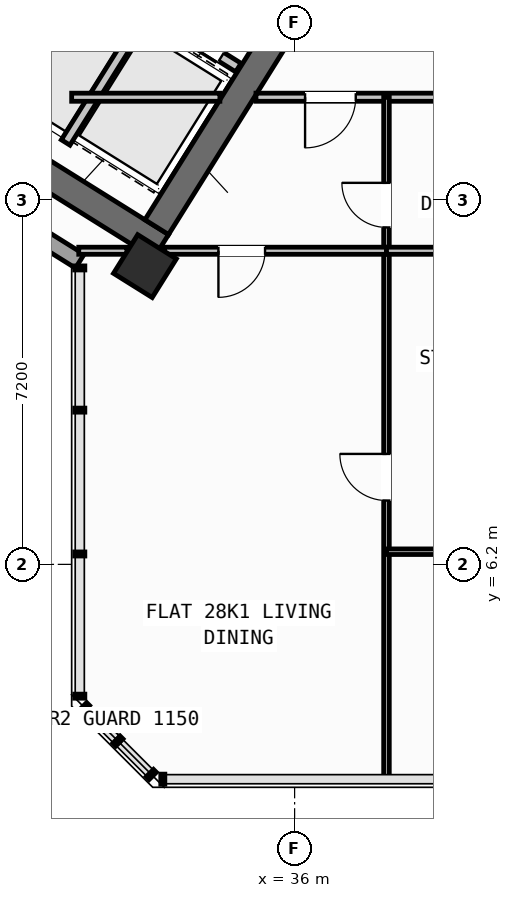
"""IFC4 building model, lengths in metres.
Left out: names, types, materials, properties, quantities, classifications, styles, units other than length and angle.
Written with IfcOpenShell. Run it as: python <this file> out.ifc"""

import sys

from ifc_helpers import new_model, si_unit, direction, frame, frame_2d, origin, origin_2d, place, context, subcontext, project, spatial, rectangle, hollow_rectangle, extrude, source, transform, mapped, element, fill, save


model = new_model("IFC4")
c1 = context("Model", 3, precision=1e-05, world=origin(), true_north=direction((0.0, 1.0)))
c2 = subcontext(c1, "Body", "Model", "MODEL_VIEW")
j1 = project(units=[si_unit("LENGTHUNIT", "METRE"), si_unit("PLANEANGLEUNIT", "RADIAN")], contexts=[c1])
p1 = place(None, origin())
s1 = spatial("IfcSite", under=j1, at=p1, CompositionType="ELEMENT")
p2 = place(p1, origin())
s2 = spatial("IfcBuilding", under=s1, at=p2, CompositionType="ELEMENT")
p3 = place(p2, frame((0.0, 0.0, 112.5)))
s3 = spatial("IfcBuildingStorey", under=s2, at=p3, CompositionType="ELEMENT", Elevation=112.5)
p4 = place(p3, frame((33.366, 12.477, 0.0), z_axis=(0.0, 0.0, 1.0), x_axis=(-0.848047359947, 0.529920442413, 0.0)))
e1 = element("IfcWall", 1, at=p4, inside=s3, PredefinedType="SHEAR", context=c2, shape_type="SweptSolid", body=[
    extrude(rectangle(XDim=13.14, YDim=0.55, at=frame_2d((6.57, 0.0))), origin(), (0.0, 0.0, 1.0), 3.35),
])
p5 = place(p3, frame((36.683, 18.304, 0.0), z_axis=(0.0, 0.0, 1.0), x_axis=(-0.529896466841, -0.848062341122, 0.0)))
e2 = element("IfcWall", 2, at=p5, inside=s3, PredefinedType="SHEAR", context=c2, shape_type="SweptSolid", body=[
    extrude(rectangle(XDim=6.425, YDim=0.55, at=frame_2d((3.212, 0.0))), origin(), (0.0, 0.0, 1.0), 3.35),
])
m1 = source(origin(), c2, "Body", "SweptSolid", [
    extrude(hollow_rectangle(XDim=0.9, YDim=0.9, WallThickness=0.036, at=origin_2d()), origin(), (0.0, 0.0, 1.0), 3.6),
])
p6 = place(p3, frame((33.046, 12.087, 0.0), z_axis=(0.0, 0.0, 1.0), x_axis=(-0.848048096156, 0.529919264233, 0.0)))
e3 = element("IfcColumn", 3, at=p6, inside=s3, PredefinedType="COLUMN", context=c2, shape_type="MappedRepresentation", body=[
    mapped(m1, transform((0.0, 0.0, 0.0), scale=1.0)),
])
p7 = place(p3, frame((31.76, 12.183, 0.0), z_axis=(0.0, 0.0, 1.0), x_axis=(-0.848047074256, 0.529920899612, 0.0)))
e4 = element("IfcWall", 4, at=p7, inside=s3, PredefinedType="STANDARD", context=c2, shape_type="SweptSolid", body=[
    extrude(rectangle(XDim=30.652, YDim=0.32, at=frame_2d((15.326, 0.0))), origin(), (0.0, 0.0, 1.0), 3.35),
])
p8 = place(p7, frame((15.153, 0.0, 0.0)))
e5 = element("IfcOpeningElement", 5, at=p8, cuts=e4, PredefinedType="OPENING", context=c2, shape_type="SweptSolid", body=[
    extrude(rectangle(XDim=1.2, YDim=2.15, at=frame_2d((0.6, 1.075))), frame((0.0, 0.17, 0.0), z_axis=(0.0, -1.0, 0.0), x_axis=(1.0, 0.0, 0.0)), (0.0, 0.0, 1.0), 0.34),
])
p9 = place(p7, frame((2.002, 0.0, 0.8)))
e6 = element("IfcOpeningElement", 6, at=p9, cuts=e4, PredefinedType="OPENING", context=c2, shape_type="SweptSolid", body=[
    extrude(rectangle(XDim=2.1, YDim=1.55, at=frame_2d((1.05, 0.775))), frame((0.0, 0.17, 0.0), z_axis=(0.0, -1.0, 0.0), x_axis=(1.0, 0.0, 0.0)), (0.0, 0.0, 1.0), 0.34),
])
p10 = place(p7, frame((7.206, 0.0, 0.8)))
e7 = element("IfcOpeningElement", 7, at=p10, cuts=e4, PredefinedType="OPENING", context=c2, shape_type="SweptSolid", body=[
    extrude(rectangle(XDim=2.1, YDim=1.55, at=frame_2d((1.05, 0.775))), frame((0.0, 0.17, 0.0), z_axis=(0.0, -1.0, 0.0), x_axis=(1.0, 0.0, 0.0)), (0.0, 0.0, 1.0), 0.34),
])
p11 = place(p7, frame((12.648, 0.0, 1.0)))
e8 = element("IfcOpeningElement", 8, at=p11, cuts=e4, PredefinedType="OPENING", context=c2, shape_type="SweptSolid", body=[
    extrude(rectangle(XDim=0.9, YDim=1.25, at=frame_2d((0.45, 0.625))), frame((0.0, 0.17, 0.0), z_axis=(0.0, -1.0, 0.0), x_axis=(1.0, 0.0, 0.0)), (0.0, 0.0, 1.0), 0.34),
])
p12 = place(p7, frame((19.59, 0.0, 0.95)))
e9 = element("IfcOpeningElement", 9, at=p12, cuts=e4, PredefinedType="OPENING", context=c2, shape_type="SweptSolid", body=[
    extrude(rectangle(XDim=1.2, YDim=1.4, at=frame_2d((0.6, 0.7))), frame((0.0, 0.17, 0.0), z_axis=(0.0, -1.0, 0.0), x_axis=(1.0, 0.0, 0.0)), (0.0, 0.0, 1.0), 0.34),
])
p13 = place(p7, frame((25.966, 0.0, 1.0)))
e10 = element("IfcOpeningElement", 10, at=p13, cuts=e4, PredefinedType="OPENING", context=c2, shape_type="SweptSolid", body=[
    extrude(rectangle(XDim=0.9, YDim=1.25, at=frame_2d((0.45, 0.625))), frame((0.0, 0.17, 0.0), z_axis=(0.0, -1.0, 0.0), x_axis=(1.0, 0.0, 0.0)), (0.0, 0.0, 1.0), 0.34),
])
p14 = place(p7, frame((28.871, 0.0, 1.0)))
e11 = element("IfcOpeningElement", 11, at=p14, cuts=e4, PredefinedType="OPENING", context=c2, shape_type="SweptSolid", body=[
    extrude(rectangle(XDim=0.9, YDim=1.25, at=frame_2d((0.45, 0.625))), frame((0.0, 0.17, 0.0), z_axis=(0.0, -1.0, 0.0), x_axis=(1.0, 0.0, 0.0)), (0.0, 0.0, 1.0), 0.34),
])
p15 = place(p3, frame((31.288, 18.256, 0.0), z_axis=(0.0, 0.0, 1.0), x_axis=(-0.529943379326, -0.848033026897, 0.0)))
e12 = element("IfcWall", 12, at=p15, inside=s3, PredefinedType="SHEAR", context=c2, shape_type="SweptSolid", body=[
    extrude(rectangle(XDim=3.16, YDim=0.26, at=frame_2d((1.58, 0.0))), origin(), (0.0, 0.0, 1.0), 3.35),
])
p16 = place(p3, frame((34.891, 16.005, 0.0), z_axis=(0.0, 0.0, 1.0), x_axis=(-0.848062873452, 0.529895614884, 0.0)))
e13 = element("IfcWall", 13, at=p16, inside=s3, PredefinedType="STANDARD", context=c2, shape_type="SweptSolid", body=[
    extrude(rectangle(XDim=4.248, YDim=0.2, at=frame_2d((2.124, 0.0))), origin(), (0.0, 0.0, 1.0), 3.34),
])
p17 = place(p16, frame((0.398, 0.0, 0.0)))
e14 = element("IfcOpeningElement", 14, at=p17, cuts=e13, PredefinedType="OPENING", context=c2, shape_type="SweptSolid", body=[
    extrude(rectangle(XDim=1.3, YDim=2.2, at=frame_2d((0.65, 1.1))), frame((0.0, 0.11, 0.0), z_axis=(0.0, -1.0, 0.0), x_axis=(1.0, 0.0, 0.0)), (0.0, 0.0, 1.0), 0.22),
])
p18 = place(p16, frame((2.473, 0.0, 0.0)))
e15 = element("IfcOpeningElement", 15, at=p18, cuts=e13, PredefinedType="OPENING", context=c2, shape_type="SweptSolid", body=[
    extrude(rectangle(XDim=1.45, YDim=2.25, at=frame_2d((0.725, 1.125))), frame((0.0, 0.11, 0.0), z_axis=(0.0, -1.0, 0.0), x_axis=(1.0, 0.0, 0.0)), (0.0, 0.0, 1.0), 0.22),
])
p19 = place(p3, frame((33.029, 17.003, 0.0), z_axis=(0.0, 0.0, 1.0), x_axis=(-0.529916267533, -0.848049968695, 0.0)))
e16 = element("IfcWall", 16, at=p19, inside=s3, PredefinedType="STANDARD", context=c2, shape_type="SweptSolid", body=[
    extrude(rectangle(XDim=2.92, YDim=0.2, at=frame_2d((1.46, 0.0))), origin(), (0.0, 0.0, 1.0), 3.34),
])
p20 = place(p3, frame((31.6, 15.42, 0.0), z_axis=(0.0, 0.0, 1.0), x_axis=(1.0, 0.0, 0.0)))
e17 = element("IfcWall", 17, at=p20, inside=s3, PredefinedType="PARTITIONING", context=c2, shape_type="SweptSolid", body=[
    extrude(rectangle(XDim=2.925, YDim=0.16, at=frame_2d((1.462, 0.0))), origin(), (0.0, 0.0, 1.0), 3.34),
])
p21 = place(p3, frame((35.237, 15.42, 0.0), z_axis=(0.0, 0.0, 1.0), x_axis=(1.0, 0.0, 0.0)))
e18 = element("IfcWall", 18, at=p21, inside=s3, PredefinedType="PARTITIONING", context=c2, shape_type="SweptSolid", body=[
    extrude(rectangle(XDim=15.432, YDim=0.16, at=frame_2d((7.716, 0.0))), origin(), (0.0, 0.0, 1.0), 3.34),
])
p22 = place(p21, frame((0.969, 0.0, 0.0)))
e19 = element("IfcOpeningElement", 19, at=p22, cuts=e18, PredefinedType="OPENING", context=c2, shape_type="SweptSolid", body=[
    extrude(rectangle(XDim=1.0, YDim=2.1, at=frame_2d((0.5, 1.05))), frame((0.0, 0.09, 0.0), z_axis=(0.0, -1.0, 0.0), x_axis=(1.0, 0.0, 0.0)), (0.0, 0.0, 1.0), 0.18),
])
p23 = place(p21, frame((8.799, 0.0, 0.0)))
e20 = element("IfcOpeningElement", 20, at=p23, cuts=e18, PredefinedType="OPENING", context=c2, shape_type="SweptSolid", body=[
    extrude(rectangle(XDim=1.0, YDim=2.1, at=frame_2d((0.5, 1.05))), frame((0.0, 0.09, 0.0), z_axis=(0.0, -1.0, 0.0), x_axis=(1.0, 0.0, 0.0)), (0.0, 0.0, 1.0), 0.18),
])
p24 = place(p3, frame((37.813, 1.96, 0.0), z_axis=(0.0, 0.0, 1.0), x_axis=(0.0, 1.0, 0.0)))
e21 = element("IfcWall", 21, at=p24, inside=s3, PredefinedType="PARTITIONING", context=c2, shape_type="SweptSolid", body=[
    extrude(rectangle(XDim=13.46, YDim=0.11, at=frame_2d((6.73, 0.0))), origin(), (0.0, 0.0, 1.0), 3.34),
])
p25 = place(p24, frame((5.5, 0.0, 0.0)))
e22 = element("IfcOpeningElement", 22, at=p25, cuts=e21, PredefinedType="OPENING", context=c2, shape_type="SweptSolid", body=[
    extrude(rectangle(XDim=0.92, YDim=2.08, at=frame_2d((0.46, 1.04))), frame((0.0, 0.065, 0.0), z_axis=(0.0, -1.0, 0.0), x_axis=(1.0, 0.0, 0.0)), (0.0, 0.0, 1.0), 0.13),
])
p26 = place(p24, frame((10.89, 0.0, 0.0)))
e23 = element("IfcOpeningElement", 23, at=p26, cuts=e21, PredefinedType="OPENING", context=c2, shape_type="SweptSolid", body=[
    extrude(rectangle(XDim=0.88, YDim=2.08, at=frame_2d((0.44, 1.04))), frame((0.0, 0.065, 0.0), z_axis=(0.0, -1.0, 0.0), x_axis=(1.0, 0.0, 0.0)), (0.0, 0.0, 1.0), 0.13),
])
p27 = place(p3, frame((31.74, 12.39, 0.0), z_axis=(0.0, 0.0, 1.0), x_axis=(1.0, 0.0, 0.0)))
e24 = element("IfcWall", 24, at=p27, inside=s3, PredefinedType="PLUMBINGWALL", context=c2, shape_type="SweptSolid", body=[
    extrude(rectangle(XDim=0.951, YDim=0.14, at=frame_2d((0.475, 0.0))), origin(), (0.0, 0.0, 1.0), 3.34),
])
p28 = place(p3, frame((33.433, 12.39, 0.0), z_axis=(0.0, 0.0, 1.0), x_axis=(1.0, 0.0, 0.0)))
e25 = element("IfcWall", 25, at=p28, inside=s3, PredefinedType="PLUMBINGWALL", context=c2, shape_type="SweptSolid", body=[
    extrude(rectangle(XDim=4.38, YDim=0.14, at=frame_2d((2.19, 0.0))), origin(), (0.0, 0.0, 1.0), 2.525),
])
p29 = place(p28, frame((1.064, 0.0, 0.0)))
e26 = element("IfcOpeningElement", 26, at=p29, cuts=e25, PredefinedType="OPENING", context=c2, shape_type="SweptSolid", body=[
    extrude(rectangle(XDim=0.92, YDim=2.08, at=frame_2d((0.46, 1.04))), frame((0.0, 0.08, 0.0), z_axis=(0.0, -1.0, 0.0), x_axis=(1.0, 0.0, 0.0)), (0.0, 0.0, 1.0), 0.16),
])
p30 = place(p3, frame((37.813, 12.39, 0.0), z_axis=(0.0, 0.0, 1.0), x_axis=(1.0, 0.0, 0.0)))
e27 = element("IfcWall", 27, at=p30, inside=s3, PredefinedType="PLUMBINGWALL", context=c2, shape_type="SweptSolid", body=[
    extrude(rectangle(XDim=4.137, YDim=0.14, at=frame_2d((2.068, 0.0))), origin(), (0.0, 0.0, 1.0), 2.525),
])
p31 = place(p3, frame((37.813, 6.45, 0.0), z_axis=(0.0, 0.0, 1.0), x_axis=(1.0, 0.0, 0.0)))
e28 = element("IfcWall", 28, at=p31, inside=s3, PredefinedType="PARTITIONING", context=c2, shape_type="SweptSolid", body=[
    extrude(rectangle(XDim=4.137, YDim=0.11, at=frame_2d((2.068, 0.0))), origin(), (0.0, 0.0, 1.0), 3.34),
])
p32 = place(p31, frame((1.608, 0.0, 0.0)))
e29 = element("IfcOpeningElement", 29, at=p32, cuts=e28, PredefinedType="OPENING", context=c2, shape_type="SweptSolid", body=[
    extrude(rectangle(XDim=0.92, YDim=2.08, at=frame_2d((0.46, 1.04))), frame((0.0, 0.065, 0.0), z_axis=(0.0, -1.0, 0.0), x_axis=(1.0, 0.0, 0.0)), (0.0, 0.0, 1.0), 0.13),
])
m2 = source(origin(), c2, "Body", "SweptSolid", [
    extrude(rectangle(XDim=1.3, YDim=2.2, at=frame_2d((0.65, 1.1))), frame((0.0, 0.025, 0.0), z_axis=(0.0, -1.0, 0.0), x_axis=(1.0, 0.0, 0.0)), (0.0, 0.0, 1.0), 0.05),
])
p33 = place(p17, origin())
e30 = element("IfcDoor", 30, at=p33, inside=s3, OperationType="DOUBLE_DOOR_SLIDING", PredefinedType="DOOR", context=c2, shape_type="MappedRepresentation", body=[
    mapped(m2, transform((0.0, 0.0, 0.0), scale=1.0)),
])
fill(e14, e30)
m3 = source(origin(), c2, "Body", "SweptSolid", [
    extrude(rectangle(XDim=0.92, YDim=2.08, at=frame_2d((0.46, 1.04))), frame((0.0, 0.025, 0.0), z_axis=(0.0, -1.0, 0.0), x_axis=(1.0, 0.0, 0.0)), (0.0, 0.0, 1.0), 0.05),
])
p34 = place(p25, origin())
e31 = element("IfcDoor", 31, at=p34, inside=s3, OperationType="SINGLE_SWING_RIGHT", PredefinedType="DOOR", context=c2, shape_type="MappedRepresentation", body=[
    mapped(m3, transform((0.0, 0.0, 0.0), scale=1.0)),
])
fill(e22, e31)
m4 = source(origin(), c2, "Body", "SweptSolid", [
    extrude(rectangle(XDim=1.0, YDim=2.1, at=frame_2d((0.5, 1.05))), frame((0.0, 0.025, 0.0), z_axis=(0.0, -1.0, 0.0), x_axis=(1.0, 0.0, 0.0)), (0.0, 0.0, 1.0), 0.05),
])
p35 = place(p22, frame((1.0, 0.0, 0.0), z_axis=(0.0, 0.0, 1.0), x_axis=(-1.0, 0.0, 0.0)))
e32 = element("IfcDoor", 32, at=p35, inside=s3, OperationType="SINGLE_SWING_RIGHT", PredefinedType="DOOR", context=c2, shape_type="MappedRepresentation", body=[
    mapped(m4, transform((0.0, 0.0, 0.0), scale=1.0)),
])
fill(e19, e32)
p36 = place(p29, frame((0.92, 0.0, 0.0), z_axis=(0.0, 0.0, 1.0), x_axis=(-1.0, 0.0, 0.0)))
e33 = element("IfcDoor", 33, at=p36, inside=s3, OperationType="SINGLE_SWING_RIGHT", PredefinedType="DOOR", context=c2, shape_type="MappedRepresentation", body=[
    mapped(m3, transform((0.0, 0.0, 0.0), scale=1.0)),
])
fill(e26, e33)
m5 = source(origin(), c2, "Body", "SweptSolid", [
    extrude(rectangle(XDim=0.88, YDim=2.08, at=frame_2d((0.44, 1.04))), frame((0.0, 0.025, 0.0), z_axis=(0.0, -1.0, 0.0), x_axis=(1.0, 0.0, 0.0)), (0.0, 0.0, 1.0), 0.05),
])
p37 = place(p26, origin())
e34 = element("IfcDoor", 34, at=p37, inside=s3, OperationType="SINGLE_SWING_RIGHT", PredefinedType="DOOR", context=c2, shape_type="MappedRepresentation", body=[
    mapped(m5, transform((0.0, 0.0, 0.0), scale=1.0)),
])
fill(e23, e34)
save(model, sys.argv[1])
